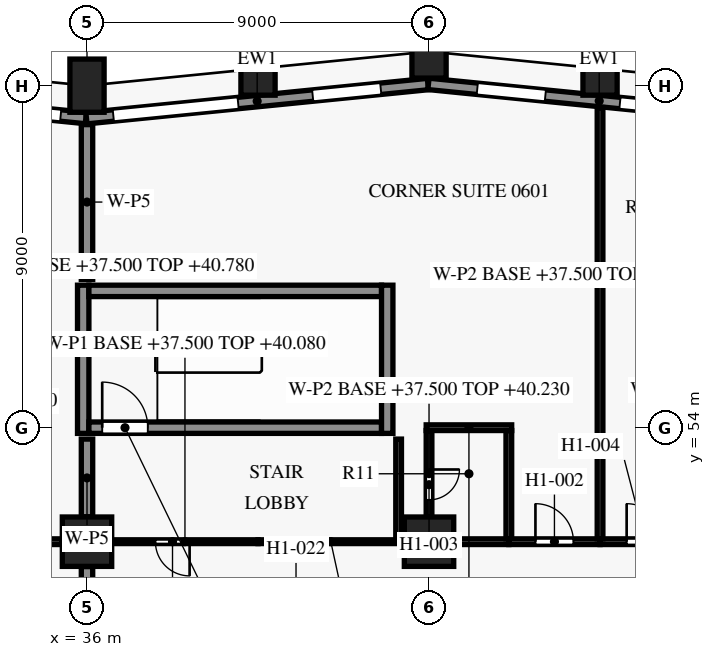
"""IFC4 building model, lengths in metres.
Left out: names, types, materials, properties, quantities, classifications, styles, units other than length and angle.
Written with IfcOpenShell. Run it as: python <this file> out.ifc"""

import sys

from ifc_helpers import new_model, si_unit, direction, frame, frame_2d, origin, origin_2d, place, context, subcontext, project, spatial, rectangle, extrude, element, fill, save


model = new_model("IFC4")
c1 = context("Model", 3, precision=1e-05, world=origin(), true_north=direction((0.0, 1.0)))
c2 = subcontext(c1, "Body", "Model", "MODEL_VIEW")
j1 = project(units=[si_unit("LENGTHUNIT", "METRE"), si_unit("PLANEANGLEUNIT", "RADIAN")], contexts=[c1])
p1 = place(None, origin())
s1 = spatial("IfcSite", under=j1, at=p1, CompositionType="ELEMENT")
p2 = place(p1, origin())
s2 = spatial("IfcBuilding", under=s1, at=p2, CompositionType="ELEMENT")
p3 = place(p2, frame((0.0, 0.0, 37.5)))
s3 = spatial("IfcBuildingStorey", under=s2, at=p3, CompositionType="ELEMENT", Elevation=37.5)
for number, where, z_axis, x_axis in (
    (1, (49.5, 63.45, 0.0), (0.0, 0.0, 1.0), (-0.995, 0.1, 0.0)),
    (2, (45.0, 63.9, 0.0), (0.0, 0.0, 1.0), (-1.0, 0.0, 0.0)),
    (3, (40.5, 63.45, 0.0), (0.0, 0.0, 1.0), (-0.995, -0.1, 0.0)),
    (4, (36.0, 63.0, 0.0), (0.0, 0.0, 1.0), (-1.0, 0.0, 0.0)),
):
    element("IfcColumn", number, at=place(p3, frame(where, z_axis=z_axis, x_axis=x_axis)), inside=s3, PredefinedType="COLUMN", context=c2, shape_type="SweptSolid", body=[
        extrude(rectangle(XDim=0.9, YDim=1.4, at=origin_2d()), origin(), (0.0, 0.0, 1.0), 3.6),
    ])
for number, where, z_axis, x_axis in (
    (5, (36.0, 51.0, 0.0), (0.0, 0.0, 1.0), (1.0, 0.0, 0.0)),
    (6, (45.0, 51.0, 0.0), (0.0, 0.0, 1.0), (1.0, 0.0, 0.0)),
):
    element("IfcColumn", number, at=place(p3, frame(where, z_axis=z_axis, x_axis=x_axis)), inside=s3, PredefinedType="COLUMN", context=c2, shape_type="SweptSolid", body=[
        extrude(rectangle(XDim=1.3, YDim=1.3, at=origin_2d()), origin(), (0.0, 0.0, 1.0), 3.6),
    ])
p4 = place(p3, frame((44.985, 63.047, 0.0), z_axis=(0.0, 0.0, 1.0), x_axis=(0.995035316196, -0.099522457379, 0.0)))
e7 = element("IfcWall", 7, at=p4, inside=s3, PredefinedType="SOLIDWALL", context=c2, shape_type="SweptSolid", body=[
    extrude(rectangle(XDim=9.03, YDim=0.3, at=frame_2d((4.515, 0.0))), origin(), (0.0, 0.0, 1.0), 2.95),
])
p5 = place(p4, frame((1.291, 0.0, 0.75)))
e8 = element("IfcOpeningElement", 8, at=p5, cuts=e7, PredefinedType="OPENING", context=c2, shape_type="SweptSolid", body=[
    extrude(rectangle(XDim=1.8, YDim=1.8, at=frame_2d((0.9, 0.9))), frame((0.0, 0.16, 0.0), z_axis=(0.0, -1.0, 0.0), x_axis=(1.0, 0.0, 0.0)), (0.0, 0.0, 1.0), 0.32),
])
p6 = place(p4, frame((5.064, 0.0, 0.15)))
e9 = element("IfcOpeningElement", 9, at=p6, cuts=e7, PredefinedType="OPENING", context=c2, shape_type="SweptSolid", body=[
    extrude(rectangle(XDim=3.3, YDim=2.4, at=frame_2d((1.65, 1.2))), frame((0.0, 0.16, 0.0), z_axis=(0.0, -1.0, 0.0), x_axis=(1.0, 0.0, 0.0)), (0.0, 0.0, 1.0), 0.32),
])
p7 = place(p3, frame((35.985, 62.144, 0.0), z_axis=(0.0, 0.0, 1.0), x_axis=(0.995037993253, 0.099495688264, 0.0)))
e10 = element("IfcWall", 10, at=p7, inside=s3, PredefinedType="SOLIDWALL", context=c2, shape_type="SweptSolid", body=[
    extrude(rectangle(XDim=9.03, YDim=0.3, at=frame_2d((4.515, 0.0))), origin(), (0.0, 0.0, 1.0), 2.95),
])
p8 = place(p7, frame((0.711, 0.0, 0.15)))
e11 = element("IfcOpeningElement", 11, at=p8, cuts=e10, PredefinedType="OPENING", context=c2, shape_type="SweptSolid", body=[
    extrude(rectangle(XDim=3.3, YDim=2.4, at=frame_2d((1.65, 1.2))), frame((0.0, 0.16, 0.0), z_axis=(0.0, -1.0, 0.0), x_axis=(1.0, 0.0, 0.0)), (0.0, 0.0, 1.0), 0.32),
])
p9 = place(p7, frame((5.984, 0.0, 0.75)))
e12 = element("IfcOpeningElement", 12, at=p9, cuts=e10, PredefinedType="OPENING", context=c2, shape_type="SweptSolid", body=[
    extrude(rectangle(XDim=1.8, YDim=1.8, at=frame_2d((0.9, 0.9))), frame((0.0, 0.16, 0.0), z_axis=(0.0, -1.0, 0.0), x_axis=(1.0, 0.0, 0.0)), (0.0, 0.0, 1.0), 0.32),
])
p10 = place(p3, frame((27.065, 63.039, 0.0), z_axis=(0.0, 0.0, 1.0), x_axis=(0.995036379926, -0.099511821531, 0.0)))
e13 = element("IfcWall", 13, at=p10, inside=s3, PredefinedType="SOLIDWALL", context=c2, shape_type="SweptSolid", body=[
    extrude(rectangle(XDim=8.95, YDim=0.3, at=frame_2d((4.475, 0.0))), origin(), (0.0, 0.0, 1.0), 2.95),
])
p11 = place(p10, frame((1.211, 0.0, 0.75)))
e14 = element("IfcOpeningElement", 14, at=p11, cuts=e13, PredefinedType="OPENING", context=c2, shape_type="SweptSolid", body=[
    extrude(rectangle(XDim=1.8, YDim=1.8, at=frame_2d((0.9, 0.9))), frame((0.0, 0.16, 0.0), z_axis=(0.0, -1.0, 0.0), x_axis=(1.0, 0.0, 0.0)), (0.0, 0.0, 1.0), 0.32),
])
p12 = place(p10, frame((4.984, 0.0, 0.15)))
e15 = element("IfcOpeningElement", 15, at=p12, cuts=e13, PredefinedType="OPENING", context=c2, shape_type="SweptSolid", body=[
    extrude(rectangle(XDim=3.3, YDim=2.4, at=frame_2d((1.65, 1.2))), frame((0.0, 0.16, 0.0), z_axis=(0.0, -1.0, 0.0), x_axis=(1.0, 0.0, 0.0)), (0.0, 0.0, 1.0), 0.32),
])
p13 = place(p3, frame((36.05, 54.0, 0.0), z_axis=(0.0, 0.0, 1.0), x_axis=(1.0, 0.0, 0.0)))
e16 = element("IfcWall", 16, at=p13, inside=s3, PredefinedType="SHEAR", context=c2, shape_type="SweptSolid", body=[
    extrude(rectangle(XDim=7.7, YDim=0.3, at=frame_2d((3.85, 0.0))), origin(), (0.0, 0.0, 1.0), 3.3),
])
p14 = place(p13, frame((0.35, 0.0, 0.0)))
e17 = element("IfcOpeningElement", 17, at=p14, cuts=e16, PredefinedType="OPENING", context=c2, shape_type="SweptSolid", body=[
    extrude(rectangle(XDim=1.2, YDim=2.2, at=frame_2d((0.6, 1.1))), frame((0.0, 0.16, 0.0), z_axis=(0.0, -1.0, 0.0), x_axis=(1.0, 0.0, 0.0)), (0.0, 0.0, 1.0), 0.32),
])
p15 = place(p3, frame((36.05, 57.6, 0.0), z_axis=(0.0, 0.0, 1.0), x_axis=(1.0, 0.0, 0.0)))
e18 = element("IfcWall", 18, at=p15, inside=s3, PredefinedType="SHEAR", context=c2, shape_type="SweptSolid", body=[
    extrude(rectangle(XDim=7.7, YDim=0.3, at=frame_2d((3.85, 0.0))), origin(), (0.0, 0.0, 1.0), 3.3),
])
for number, where, z_axis, x_axis in (
    (19, (35.9, 53.85, 0.0), (0.0, 0.0, 1.0), (0.0, 1.0, 0.0)),
    (20, (43.9, 53.85, 0.0), (0.0, 0.0, 1.0), (0.0, 1.0, 0.0)),
):
    element("IfcWall", number, at=place(p3, frame(where, z_axis=z_axis, x_axis=x_axis)), inside=s3, PredefinedType="SHEAR", context=c2, shape_type="SweptSolid", body=[
        extrude(rectangle(XDim=3.9, YDim=0.3, at=frame_2d((1.95, 0.0))), origin(), (0.0, 0.0, 1.0), 3.3),
    ])
p16 = place(p3, frame((36.0, 50.345, 0.0), z_axis=(0.0, 0.0, 1.0), x_axis=(0.0, -1.0, 0.0)))
e21 = element("IfcWall", 21, at=p16, inside=s3, PredefinedType="PARTITIONING", context=c2, shape_type="SweptSolid", body=[
    extrude(rectangle(XDim=3.295, YDim=0.3, at=frame_2d((1.647, 0.0))), origin(), (0.0, 0.0, 1.0), 2.58),
])
p17 = place(p3, frame((33.6, 51.0, 0.0), z_axis=(0.0, 0.0, 1.0), x_axis=(1.0, 0.0, 0.0)))
e22 = element("IfcWall", 22, at=p17, inside=s3, PredefinedType="PARTITIONING", context=c2, shape_type="SweptSolid", body=[
    extrude(rectangle(XDim=1.745, YDim=0.15, at=frame_2d((0.873, 0.0))), origin(), (0.0, 0.0, 1.0), 3.28),
])
p18 = place(p3, frame((40.5, 51.0, 0.0), z_axis=(0.0, 0.0, 1.0), x_axis=(-1.0, 0.0, 0.0)))
e23 = element("IfcWall", 23, at=p18, inside=s3, PredefinedType="PARTITIONING", context=c2, shape_type="SweptSolid", body=[
    extrude(rectangle(XDim=3.845, YDim=0.1, at=frame_2d((1.922, 0.0))), origin(), (0.0, 0.0, 1.0), 2.58),
])
p19 = place(p18, frame((1.8, 0.0, 0.0)))
e24 = element("IfcOpeningElement", 24, at=p19, cuts=e23, PredefinedType="OPENING", context=c2, shape_type="SweptSolid", body=[
    extrude(rectangle(XDim=0.9, YDim=2.1, at=frame_2d((0.45, 1.05))), frame((0.0, 0.06, 0.0), z_axis=(0.0, -1.0, 0.0), x_axis=(1.0, 0.0, 0.0)), (0.0, 0.0, 1.0), 0.12),
])
p20 = place(p3, frame((44.33, 51.0, 0.0), z_axis=(0.0, 0.0, 1.0), x_axis=(-1.0, 0.0, 0.0)))
e25 = element("IfcWall", 25, at=p20, inside=s3, PredefinedType="PARTITIONING", context=c2, shape_type="SweptSolid", body=[
    extrude(rectangle(XDim=3.83, YDim=0.1, at=frame_2d((1.915, 0.0))), origin(), (0.0, 0.0, 1.0), 2.58),
])
p21 = place(p3, frame((45.655, 51.0, 0.0), z_axis=(0.0, 0.0, 1.0), x_axis=(1.0, 0.0, 0.0)))
e26 = element("IfcWall", 26, at=p21, inside=s3, PredefinedType="PARTITIONING", context=c2, shape_type="SweptSolid", body=[
    extrude(rectangle(XDim=1.445, YDim=0.15, at=frame_2d((0.723, 0.0))), origin(), (0.0, 0.0, 1.0), 2.58),
])
p22 = place(p3, frame((47.1, 51.0, 0.0), z_axis=(0.0, 0.0, 1.0), x_axis=(1.0, 0.0, 0.0)))
e27 = element("IfcWall", 27, at=p22, inside=s3, PredefinedType="PARTITIONING", context=c2, shape_type="SweptSolid", body=[
    extrude(rectangle(XDim=2.4, YDim=0.15, at=frame_2d((1.2, 0.0))), origin(), (0.0, 0.0, 1.0), 2.58),
])
p23 = place(p22, frame((0.7, 0.0, 0.0)))
e28 = element("IfcOpeningElement", 28, at=p23, cuts=e27, PredefinedType="OPENING", context=c2, shape_type="SweptSolid", body=[
    extrude(rectangle(XDim=1.0, YDim=2.1, at=frame_2d((0.5, 1.05))), frame((0.0, 0.085, 0.0), z_axis=(0.0, -1.0, 0.0), x_axis=(1.0, 0.0, 0.0)), (0.0, 0.0, 1.0), 0.17),
])
p24 = place(p3, frame((49.5, 51.0, 0.0), z_axis=(0.0, 0.0, 1.0), x_axis=(1.0, 0.0, 0.0)))
e29 = element("IfcWall", 29, at=p24, inside=s3, PredefinedType="PARTITIONING", context=c2, shape_type="SweptSolid", body=[
    extrude(rectangle(XDim=2.4, YDim=0.15, at=frame_2d((1.2, 0.0))), origin(), (0.0, 0.0, 1.0), 2.58),
])
p25 = place(p24, frame((0.7, 0.0, 0.0)))
e30 = element("IfcOpeningElement", 30, at=p25, cuts=e29, PredefinedType="OPENING", context=c2, shape_type="SweptSolid", body=[
    extrude(rectangle(XDim=1.0, YDim=2.1, at=frame_2d((0.5, 1.05))), frame((0.0, 0.085, 0.0), z_axis=(0.0, -1.0, 0.0), x_axis=(1.0, 0.0, 0.0)), (0.0, 0.0, 1.0), 0.17),
])
p26 = place(p3, frame((47.1, 51.075, 0.0), z_axis=(0.0, 0.0, 1.0), x_axis=(0.0, 1.0, 0.0)))
e31 = element("IfcWall", 31, at=p26, inside=s3, PredefinedType="PARTITIONING", context=c2, shape_type="SweptSolid", body=[
    extrude(rectangle(XDim=2.85, YDim=0.15, at=frame_2d((1.425, 0.0))), origin(), (0.0, 0.0, 1.0), 2.58),
])
p27 = place(p3, frame((36.0, 53.7, 0.0), z_axis=(0.0, 0.0, 1.0), x_axis=(0.0, -1.0, 0.0)))
e32 = element("IfcWall", 32, at=p27, inside=s3, PredefinedType="PARTITIONING", context=c2, shape_type="SweptSolid", body=[
    extrude(rectangle(XDim=2.045, YDim=0.3, at=frame_2d((1.022, 0.0))), origin(), (0.0, 0.0, 1.0), 2.58),
])
p28 = place(p3, frame((44.2, 53.7, 0.0), z_axis=(0.0, 0.0, 1.0), x_axis=(0.0, -1.0, 0.0)))
e33 = element("IfcWall", 33, at=p28, inside=s3, PredefinedType="PARTITIONING", context=c2, shape_type="SweptSolid", body=[
    extrude(rectangle(XDim=2.625, YDim=0.15, at=frame_2d((1.312, 0.0))), origin(), (0.0, 0.0, 1.0), 2.58),
])
p29 = place(p3, frame((45.0, 53.925, 0.0), z_axis=(0.0, 0.0, 1.0), x_axis=(0.0, -1.0, 0.0)))
e34 = element("IfcWall", 34, at=p29, inside=s3, PredefinedType="PARTITIONING", context=c2, shape_type="SweptSolid", body=[
    extrude(rectangle(XDim=2.27, YDim=0.15, at=frame_2d((1.135, 0.0))), origin(), (0.0, 0.0, 1.0), 2.73),
])
p30 = place(p29, frame((1.025, 0.0, 0.0)))
e35 = element("IfcOpeningElement", 35, at=p30, cuts=e34, PredefinedType="OPENING", context=c2, shape_type="SweptSolid", body=[
    extrude(rectangle(XDim=0.8, YDim=2.1, at=frame_2d((0.4, 1.05))), frame((0.0, 0.085, 0.0), z_axis=(0.0, -1.0, 0.0), x_axis=(1.0, 0.0, 0.0)), (0.0, 0.0, 1.0), 0.17),
])
p31 = place(p3, frame((47.175, 54.0, 0.0), z_axis=(0.0, 0.0, 1.0), x_axis=(-1.0, 0.0, 0.0)))
e36 = element("IfcWall", 36, at=p31, inside=s3, PredefinedType="PARTITIONING", context=c2, shape_type="SweptSolid", body=[
    extrude(rectangle(XDim=2.25, YDim=0.15, at=frame_2d((1.125, 0.0))), origin(), (0.0, 0.0, 1.0), 2.73),
])
p32 = place(p3, frame((36.0, 61.975, 0.0), z_axis=(0.0, 0.0, 1.0), x_axis=(0.0, -1.0, 0.0)))
e37 = element("IfcWall", 37, at=p32, inside=s3, PredefinedType="PARTITIONING", context=c2, shape_type="SweptSolid", body=[
    extrude(rectangle(XDim=4.075, YDim=0.3, at=frame_2d((2.038, 0.0))), origin(), (0.0, 0.0, 1.0), 2.58),
])
p33 = place(p3, frame((49.5, 62.425, 0.0), z_axis=(0.0, 0.0, 1.0), x_axis=(0.0, -1.0, 0.0)))
e38 = element("IfcWall", 38, at=p33, inside=s3, PredefinedType="PARTITIONING", context=c2, shape_type="SweptSolid", body=[
    extrude(rectangle(XDim=11.35, YDim=0.15, at=frame_2d((5.675, 0.0))), origin(), (0.0, 0.0, 1.0), 2.58),
])
p34 = place(p5, origin())
e39 = element("IfcWindow", 39, at=p34, inside=s3, PartitioningType="SINGLE_PANEL", PredefinedType="WINDOW", context=c2, shape_type="SweptSolid", body=[
    extrude(rectangle(XDim=1.8, YDim=1.8, at=frame_2d((0.9, 0.9))), frame((0.0, 0.03, 0.0), z_axis=(0.0, -1.0, 0.0), x_axis=(1.0, 0.0, 0.0)), (0.0, 0.0, 1.0), 0.06),
])
fill(e8, e39)
p35 = place(p6, origin())
e40 = element("IfcWindow", 40, at=p35, inside=s3, PartitioningType="SINGLE_PANEL", PredefinedType="WINDOW", context=c2, shape_type="SweptSolid", body=[
    extrude(rectangle(XDim=3.3, YDim=2.4, at=frame_2d((1.65, 1.2))), frame((0.0, 0.03, 0.0), z_axis=(0.0, -1.0, 0.0), x_axis=(1.0, 0.0, 0.0)), (0.0, 0.0, 1.0), 0.06),
])
fill(e9, e40)
p36 = place(p8, origin())
e41 = element("IfcWindow", 41, at=p36, inside=s3, PartitioningType="SINGLE_PANEL", PredefinedType="WINDOW", context=c2, shape_type="SweptSolid", body=[
    extrude(rectangle(XDim=3.3, YDim=2.4, at=frame_2d((1.65, 1.2))), frame((0.0, 0.03, 0.0), z_axis=(0.0, -1.0, 0.0), x_axis=(1.0, 0.0, 0.0)), (0.0, 0.0, 1.0), 0.06),
])
fill(e11, e41)
p37 = place(p9, origin())
e42 = element("IfcWindow", 42, at=p37, inside=s3, PartitioningType="SINGLE_PANEL", PredefinedType="WINDOW", context=c2, shape_type="SweptSolid", body=[
    extrude(rectangle(XDim=1.8, YDim=1.8, at=frame_2d((0.9, 0.9))), frame((0.0, 0.03, 0.0), z_axis=(0.0, -1.0, 0.0), x_axis=(1.0, 0.0, 0.0)), (0.0, 0.0, 1.0), 0.06),
])
fill(e12, e42)
p38 = place(p12, origin())
e43 = element("IfcWindow", 43, at=p38, inside=s3, PartitioningType="SINGLE_PANEL", PredefinedType="WINDOW", context=c2, shape_type="SweptSolid", body=[
    extrude(rectangle(XDim=3.3, YDim=2.4, at=frame_2d((1.65, 1.2))), frame((0.0, 0.03, 0.0), z_axis=(0.0, -1.0, 0.0), x_axis=(1.0, 0.0, 0.0)), (0.0, 0.0, 1.0), 0.06),
])
fill(e15, e43)
p39 = place(p14, origin())
e44 = element("IfcDoor", 44, at=p39, inside=s3, OperationType="SINGLE_SWING_LEFT", PredefinedType="DOOR", context=c2, shape_type="SweptSolid", body=[
    extrude(rectangle(XDim=1.2, YDim=2.2, at=frame_2d((0.6, 1.1))), frame((0.0, 0.025, 0.0), z_axis=(0.0, -1.0, 0.0), x_axis=(1.0, 0.0, 0.0)), (0.0, 0.0, 1.0), 0.05),
])
fill(e17, e44)
p40 = place(p19, origin())
e45 = element("IfcDoor", 45, at=p40, inside=s3, OperationType="SINGLE_SWING_LEFT", PredefinedType="DOOR", context=c2, shape_type="SweptSolid", body=[
    extrude(rectangle(XDim=0.9, YDim=2.1, at=frame_2d((0.45, 1.05))), frame((0.0, 0.025, 0.0), z_axis=(0.0, -1.0, 0.0), x_axis=(1.0, 0.0, 0.0)), (0.0, 0.0, 1.0), 0.05),
])
fill(e24, e45)
p41 = place(p23, origin())
e46 = element("IfcDoor", 46, at=p41, inside=s3, OperationType="SINGLE_SWING_LEFT", PredefinedType="DOOR", context=c2, shape_type="SweptSolid", body=[
    extrude(rectangle(XDim=1.0, YDim=2.1, at=frame_2d((0.5, 1.05))), frame((0.0, 0.025, 0.0), z_axis=(0.0, -1.0, 0.0), x_axis=(1.0, 0.0, 0.0)), (0.0, 0.0, 1.0), 0.05),
])
fill(e28, e46)
p42 = place(p30, origin())
e47 = element("IfcDoor", 47, at=p42, inside=s3, OperationType="SINGLE_SWING_RIGHT", PredefinedType="DOOR", context=c2, shape_type="SweptSolid", body=[
    extrude(rectangle(XDim=0.8, YDim=2.1, at=frame_2d((0.4, 1.05))), frame((0.0, 0.025, 0.0), z_axis=(0.0, -1.0, 0.0), x_axis=(1.0, 0.0, 0.0)), (0.0, 0.0, 1.0), 0.05),
])
fill(e35, e47)
p43 = place(p25, origin())
e48 = element("IfcDoor", 48, at=p43, inside=s3, OperationType="SINGLE_SWING_LEFT", PredefinedType="DOOR", context=c2, shape_type="SweptSolid", body=[
    extrude(rectangle(XDim=1.0, YDim=2.1, at=frame_2d((0.5, 1.05))), frame((0.0, 0.025, 0.0), z_axis=(0.0, -1.0, 0.0), x_axis=(1.0, 0.0, 0.0)), (0.0, 0.0, 1.0), 0.05),
])
fill(e30, e48)
save(model, sys.argv[1])
